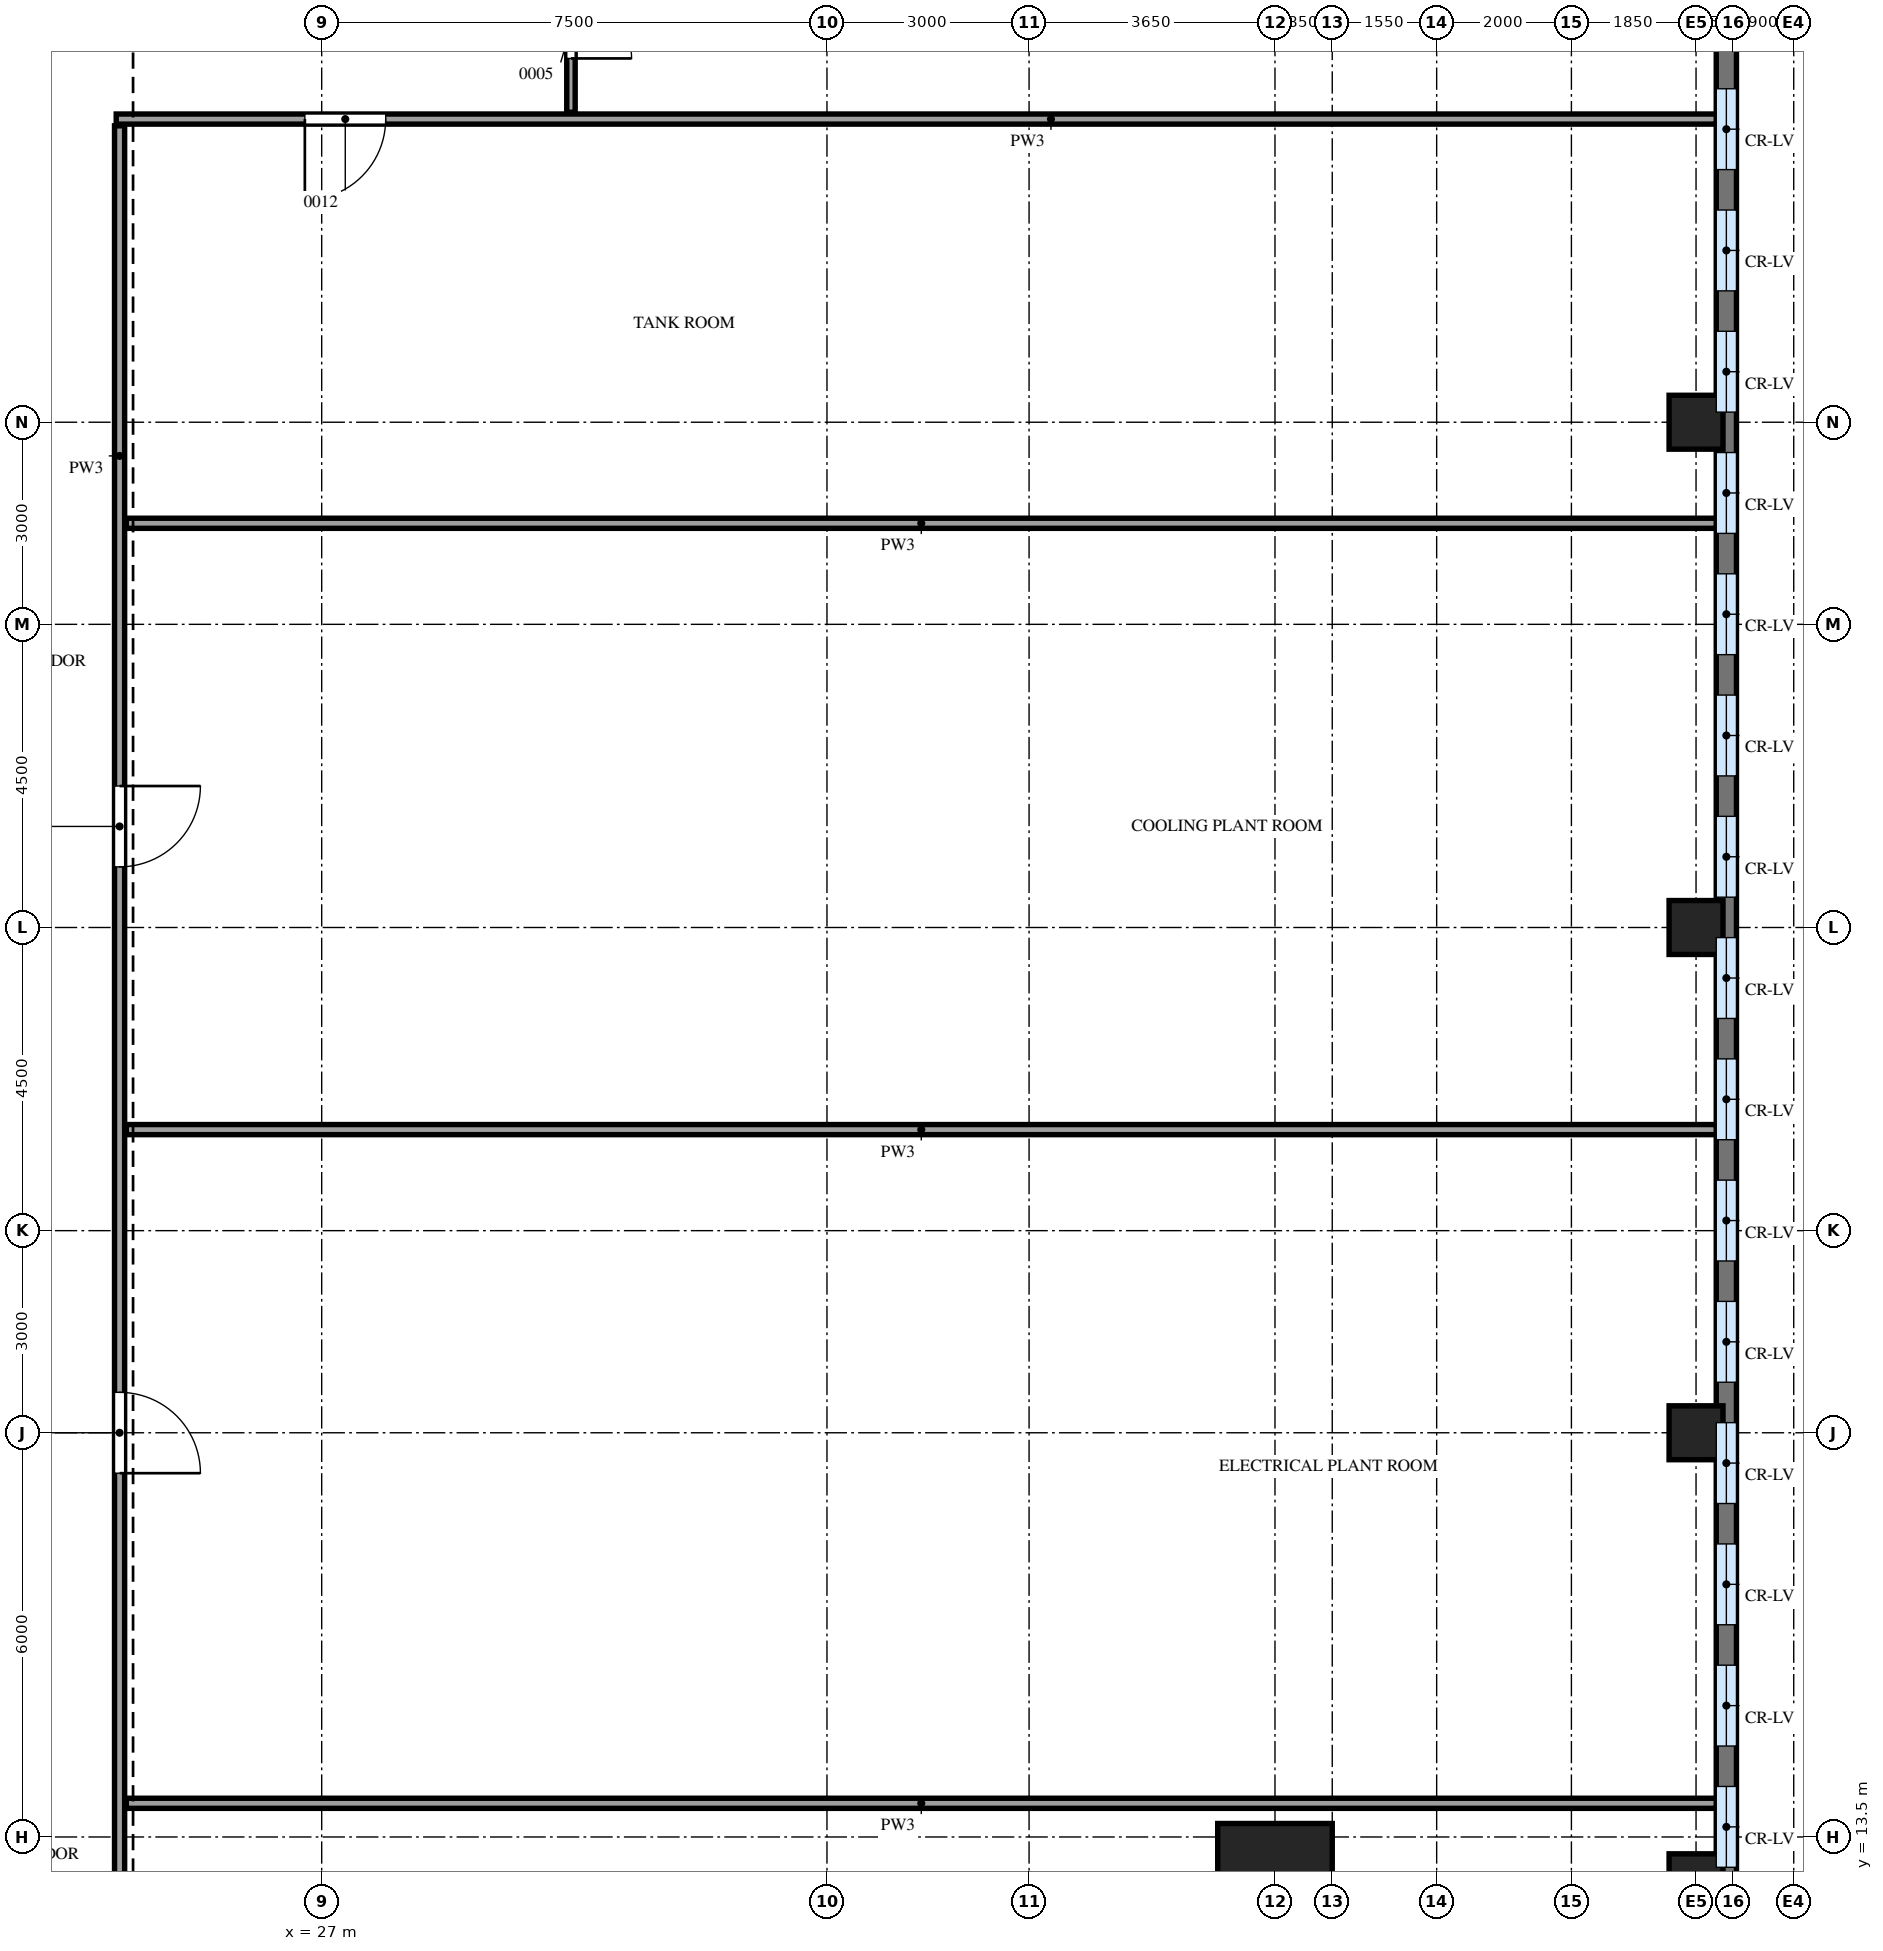
"""IFC4 building model, lengths in metres.
Left out: names, types, materials, properties, quantities, classifications, styles, units other than length and angle.
Written with IfcOpenShell. Run it as: python <this file> out.ifc"""

import sys

from ifc_helpers import new_model, si_unit, direction, frame, frame_2d, origin, origin_2d, place, context, subcontext, project, spatial, rectangle, extrude, source, transform, mapped, element, fill, save


model = new_model("IFC4")
c1 = context("Model", 3, precision=1e-05, world=origin(), true_north=direction((0.0, 1.0)))
c2 = subcontext(c1, "Body", "Model", "MODEL_VIEW")
j1 = project(units=[si_unit("LENGTHUNIT", "METRE"), si_unit("PLANEANGLEUNIT", "RADIAN")], contexts=[c1])
p1 = place(None, origin())
s1 = spatial("IfcSite", under=j1, at=p1, CompositionType="ELEMENT")
p2 = place(p1, origin())
s2 = spatial("IfcBuilding", under=s1, at=p2, CompositionType="ELEMENT")
p3 = place(p2, frame((0.0, 0.0, 330.2)))
s3 = spatial("IfcBuildingStorey", under=s2, at=p3, CompositionType="ELEMENT", Elevation=330.2)
m1 = source(origin(), c2, "Body", "SweptSolid", [
    extrude(rectangle(XDim=1.7, YDim=1.7, at=origin_2d()), origin(), (0.0, 0.0, 1.0), 4.5),
])
p4 = place(p3, frame((41.15, 12.85, 0.0), z_axis=(0.0, 0.0, 1.0), x_axis=(1.0, 0.0, 0.0)))
e1 = element("IfcColumn", 1, at=p4, inside=s3, PredefinedType="COLUMN", context=c2, shape_type="MappedRepresentation", body=[
    mapped(m1, transform((0.0, 0.0, 0.0))),
])
m2 = source(origin(), c2, "Body", "SweptSolid", [
    extrude(rectangle(XDim=0.8, YDim=0.8, at=origin_2d()), origin(), (0.0, 0.0, 1.0), 4.5),
])
for number, where, z_axis, x_axis in (
    (2, (47.4, 12.85, 0.0), (0.0, 0.0, 1.0), (1.0, 0.0, 0.0)),
    (3, (47.4, 19.5, 0.0), (0.0, 0.0, 1.0), (1.0, 0.0, 0.0)),
    (4, (47.4, 27.0, 0.0), (0.0, 0.0, 1.0), (1.0, 0.0, 0.0)),
    (5, (47.4, 34.5, 0.0), (0.0, 0.0, 1.0), (1.0, 0.0, 0.0)),
):
    element("IfcColumn", number, at=place(p3, frame(where, z_axis=z_axis, x_axis=x_axis)), inside=s3, PredefinedType="COLUMN", context=c2, shape_type="MappedRepresentation", body=[
        mapped(m2, transform((0.0, 0.0, 0.0))),
    ])
m3 = source(origin(), c2, "Body", "SweptSolid", [
    extrude(rectangle(XDim=29.7, YDim=0.3, at=frame_2d((14.85, 0.0))), origin(), (0.0, 0.0, 1.0), 4.5),
])
p5 = place(p3, frame((47.85, 12.3, 0.0), z_axis=(0.0, 0.0, 1.0), x_axis=(0.0, 1.0, 0.0)))
e6 = element("IfcWall", 6, at=p5, inside=s3, PredefinedType="SOLIDWALL", context=c2, shape_type="MappedRepresentation", body=[
    mapped(m3, transform((0.0, 0.0, 0.0))),
])
m4 = source(origin(), c2, "Body", "SweptSolid", [
    extrude(rectangle(XDim=1.2, YDim=2.4, at=frame_2d((0.6, 1.2))), frame((0.0, 0.16, 0.0), z_axis=(0.0, -1.0, 0.0), x_axis=(1.0, 0.0, 0.0)), (0.0, 0.0, 1.0), 0.32),
])
p6 = place(p5, frame((0.75, 0.0, 0.9)))
e7 = element("IfcOpeningElement", 7, at=p6, cuts=e6, PredefinedType="OPENING", context=c2, shape_type="MappedRepresentation", body=[
    mapped(m4, transform((0.0, 0.0, 0.0))),
])
p7 = place(p5, frame((2.55, 0.0, 0.9)))
e8 = element("IfcOpeningElement", 8, at=p7, cuts=e6, PredefinedType="OPENING", context=c2, shape_type="MappedRepresentation", body=[
    mapped(m4, transform((0.0, 0.0, 0.0))),
])
p8 = place(p5, frame((4.35, 0.0, 0.9)))
e9 = element("IfcOpeningElement", 9, at=p8, cuts=e6, PredefinedType="OPENING", context=c2, shape_type="MappedRepresentation", body=[
    mapped(m4, transform((0.0, 0.0, 0.0))),
])
p9 = place(p5, frame((6.15, 0.0, 0.9)))
e10 = element("IfcOpeningElement", 10, at=p9, cuts=e6, PredefinedType="OPENING", context=c2, shape_type="MappedRepresentation", body=[
    mapped(m4, transform((0.0, 0.0, 0.0))),
])
p10 = place(p5, frame((7.95, 0.0, 0.9)))
e11 = element("IfcOpeningElement", 11, at=p10, cuts=e6, PredefinedType="OPENING", context=c2, shape_type="MappedRepresentation", body=[
    mapped(m4, transform((0.0, 0.0, 0.0))),
])
p11 = place(p5, frame((9.75, 0.0, 0.9)))
e12 = element("IfcOpeningElement", 12, at=p11, cuts=e6, PredefinedType="OPENING", context=c2, shape_type="MappedRepresentation", body=[
    mapped(m4, transform((0.0, 0.0, 0.0))),
])
p12 = place(p5, frame((11.55, 0.0, 0.9)))
e13 = element("IfcOpeningElement", 13, at=p12, cuts=e6, PredefinedType="OPENING", context=c2, shape_type="MappedRepresentation", body=[
    mapped(m4, transform((0.0, 0.0, 0.0))),
])
p13 = place(p5, frame((13.35, 0.0, 0.9)))
e14 = element("IfcOpeningElement", 14, at=p13, cuts=e6, PredefinedType="OPENING", context=c2, shape_type="MappedRepresentation", body=[
    mapped(m4, transform((0.0, 0.0, 0.0))),
])
p14 = place(p5, frame((15.15, 0.0, 0.9)))
e15 = element("IfcOpeningElement", 15, at=p14, cuts=e6, PredefinedType="OPENING", context=c2, shape_type="MappedRepresentation", body=[
    mapped(m4, transform((0.0, 0.0, 0.0))),
])
p15 = place(p5, frame((16.95, 0.0, 0.9)))
e16 = element("IfcOpeningElement", 16, at=p15, cuts=e6, PredefinedType="OPENING", context=c2, shape_type="MappedRepresentation", body=[
    mapped(m4, transform((0.0, 0.0, 0.0))),
])
p16 = place(p5, frame((18.75, 0.0, 0.9)))
e17 = element("IfcOpeningElement", 17, at=p16, cuts=e6, PredefinedType="OPENING", context=c2, shape_type="MappedRepresentation", body=[
    mapped(m4, transform((0.0, 0.0, 0.0))),
])
p17 = place(p5, frame((20.55, 0.0, 0.9)))
e18 = element("IfcOpeningElement", 18, at=p17, cuts=e6, PredefinedType="OPENING", context=c2, shape_type="MappedRepresentation", body=[
    mapped(m4, transform((0.0, 0.0, 0.0))),
])
p18 = place(p5, frame((22.35, 0.0, 0.9)))
e19 = element("IfcOpeningElement", 19, at=p18, cuts=e6, PredefinedType="OPENING", context=c2, shape_type="MappedRepresentation", body=[
    mapped(m4, transform((0.0, 0.0, 0.0))),
])
p19 = place(p5, frame((24.15, 0.0, 0.9)))
e20 = element("IfcOpeningElement", 20, at=p19, cuts=e6, PredefinedType="OPENING", context=c2, shape_type="MappedRepresentation", body=[
    mapped(m4, transform((0.0, 0.0, 0.0))),
])
p20 = place(p5, frame((25.95, 0.0, 0.9)))
e21 = element("IfcOpeningElement", 21, at=p20, cuts=e6, PredefinedType="OPENING", context=c2, shape_type="MappedRepresentation", body=[
    mapped(m4, transform((0.0, 0.0, 0.0))),
])
p21 = place(p5, frame((27.75, 0.0, 0.9)))
e22 = element("IfcOpeningElement", 22, at=p21, cuts=e6, PredefinedType="OPENING", context=c2, shape_type="MappedRepresentation", body=[
    mapped(m4, transform((0.0, 0.0, 0.0))),
])
m5 = source(origin(), c2, "Body", "SweptSolid", [
    extrude(rectangle(XDim=32.6, YDim=0.15, at=frame_2d((16.3, 0.0))), origin(), (0.0, 0.0, 1.0), 4.3),
])
p22 = place(p3, frame((24.0, 6.3, 0.0), z_axis=(0.0, 0.0, 1.0), x_axis=(0.0, 1.0, 0.0)))
e23 = element("IfcWall", 23, at=p22, inside=s3, PredefinedType="PARTITIONING", context=c2, shape_type="MappedRepresentation", body=[
    mapped(m5, transform((0.0, 0.0, 0.0))),
])
m6 = source(origin(), c2, "Body", "SweptSolid", [
    extrude(rectangle(XDim=1.2, YDim=2.1, at=frame_2d((0.6, 1.05))), frame((0.0, 0.085, 0.0), z_axis=(0.0, -1.0, 0.0), x_axis=(1.0, 0.0, 0.0)), (0.0, 0.0, 1.0), 0.17),
])
p23 = place(p22, frame((3.1, 0.0, 0.0)))
e24 = element("IfcOpeningElement", 24, at=p23, cuts=e23, PredefinedType="OPENING", context=c2, shape_type="MappedRepresentation", body=[
    mapped(m6, transform((0.0, 0.0, 0.0))),
])
p24 = place(p22, frame((12.6, 0.0, 0.0)))
e25 = element("IfcOpeningElement", 25, at=p24, cuts=e23, PredefinedType="OPENING", context=c2, shape_type="MappedRepresentation", body=[
    mapped(m6, transform((0.0, 0.0, 0.0))),
])
p25 = place(p22, frame((21.6, 0.0, 0.0)))
e26 = element("IfcOpeningElement", 26, at=p25, cuts=e23, PredefinedType="OPENING", context=c2, shape_type="MappedRepresentation", body=[
    mapped(m6, transform((0.0, 0.0, 0.0))),
])
m7 = source(origin(), c2, "Body", "SweptSolid", [
    extrude(rectangle(XDim=23.6, YDim=0.15, at=frame_2d((11.8, 0.0))), origin(), (0.0, 0.0, 1.0), 4.3),
])
for number, where, z_axis, x_axis in (
    (27, (24.1, 14.0, 0.0), (0.0, 0.0, 1.0), (1.0, 0.0, 0.0)),
    (28, (24.1, 24.0, 0.0), (0.0, 0.0, 1.0), (1.0, 0.0, 0.0)),
    (29, (24.1, 33.0, 0.0), (0.0, 0.0, 1.0), (1.0, 0.0, 0.0)),
):
    element("IfcWall", number, at=place(p3, frame(where, z_axis=z_axis, x_axis=x_axis)), inside=s3, PredefinedType="PARTITIONING", context=c2, shape_type="MappedRepresentation", body=[
        mapped(m7, transform((0.0, 0.0, 0.0))),
    ])
m8 = source(origin(), c2, "Body", "SweptSolid", [
    extrude(rectangle(XDim=23.75, YDim=0.15, at=frame_2d((11.875, 0.0))), origin(), (0.0, 0.0, 1.0), 4.3),
])
p26 = place(p3, frame((23.95, 39.0, 0.0), z_axis=(0.0, 0.0, 1.0), x_axis=(1.0, 0.0, 0.0)))
e30 = element("IfcWall", 30, at=p26, inside=s3, PredefinedType="PARTITIONING", context=c2, shape_type="MappedRepresentation", body=[
    mapped(m8, transform((0.0, 0.0, 0.0))),
])
p27 = place(p26, frame((2.8, 0.0, 0.0)))
e31 = element("IfcOpeningElement", 31, at=p27, cuts=e30, PredefinedType="OPENING", context=c2, shape_type="MappedRepresentation", body=[
    mapped(m6, transform((0.0, 0.0, 0.0))),
])
m9 = source(origin(), c2, "Body", "SweptSolid", [
    extrude(rectangle(XDim=8.6, YDim=0.125, at=frame_2d((4.3, 0.0))), origin(), (0.0, 0.0, 1.0), 4.3),
])
p28 = place(p3, frame((30.7, 39.1, 0.0), z_axis=(0.0, 0.0, 1.0), x_axis=(0.0, 1.0, 0.0)))
e32 = element("IfcWall", 32, at=p28, inside=s3, PredefinedType="PARTITIONING", context=c2, shape_type="MappedRepresentation", body=[
    mapped(m9, transform((0.0, 0.0, 0.0))),
])
m10 = source(origin(), c2, "Body", "SweptSolid", [
    extrude(rectangle(XDim=0.9, YDim=2.1, at=frame_2d((0.45, 1.05))), frame((0.0, 0.073, 0.0), z_axis=(0.0, -1.0, 0.0), x_axis=(1.0, 0.0, 0.0)), (0.0, 0.0, 1.0), 0.145),
])
p29 = place(p28, frame((0.8, 0.0, 0.0)))
e33 = element("IfcOpeningElement", 33, at=p29, cuts=e32, PredefinedType="OPENING", context=c2, shape_type="MappedRepresentation", body=[
    mapped(m10, transform((0.0, 0.0, 0.0))),
])
m11 = source(origin(), c2, "Body", "SweptSolid", [
    extrude(rectangle(XDim=1.2, YDim=2.1, at=frame_2d((0.6, 1.05))), frame((0.0, 0.073, 0.0), z_axis=(0.0, -1.0, 0.0), x_axis=(1.0, 0.0, 0.0)), (0.0, 0.0, 1.0), 0.145),
])
p30 = place(p28, frame((4.1, 0.0, 0.0)))
e34 = element("IfcOpeningElement", 34, at=p30, cuts=e32, PredefinedType="OPENING", context=c2, shape_type="MappedRepresentation", body=[
    mapped(m11, transform((0.0, 0.0, 0.0))),
])
m12 = source(origin(), c2, "Body", "SweptSolid", [
    extrude(rectangle(XDim=1.2, YDim=2.4, at=frame_2d((0.6, 1.2))), frame((0.0, 0.03, 0.0), z_axis=(0.0, -1.0, 0.0), x_axis=(1.0, 0.0, 0.0)), (0.0, 0.0, 1.0), 0.06),
])
p31 = place(p6, origin())
e35 = element("IfcWindow", 35, at=p31, inside=s3, PartitioningType="SINGLE_PANEL", PredefinedType="WINDOW", context=c2, shape_type="MappedRepresentation", body=[
    mapped(m12, transform((0.0, 0.0, 0.0))),
])
fill(e7, e35)
p32 = place(p7, origin())
e36 = element("IfcWindow", 36, at=p32, inside=s3, PartitioningType="SINGLE_PANEL", PredefinedType="WINDOW", context=c2, shape_type="MappedRepresentation", body=[
    mapped(m12, transform((0.0, 0.0, 0.0))),
])
fill(e8, e36)
p33 = place(p8, origin())
e37 = element("IfcWindow", 37, at=p33, inside=s3, PartitioningType="SINGLE_PANEL", PredefinedType="WINDOW", context=c2, shape_type="MappedRepresentation", body=[
    mapped(m12, transform((0.0, 0.0, 0.0))),
])
fill(e9, e37)
p34 = place(p9, origin())
e38 = element("IfcWindow", 38, at=p34, inside=s3, PartitioningType="SINGLE_PANEL", PredefinedType="WINDOW", context=c2, shape_type="MappedRepresentation", body=[
    mapped(m12, transform((0.0, 0.0, 0.0))),
])
fill(e10, e38)
p35 = place(p10, origin())
e39 = element("IfcWindow", 39, at=p35, inside=s3, PartitioningType="SINGLE_PANEL", PredefinedType="WINDOW", context=c2, shape_type="MappedRepresentation", body=[
    mapped(m12, transform((0.0, 0.0, 0.0))),
])
fill(e11, e39)
p36 = place(p11, origin())
e40 = element("IfcWindow", 40, at=p36, inside=s3, PartitioningType="SINGLE_PANEL", PredefinedType="WINDOW", context=c2, shape_type="MappedRepresentation", body=[
    mapped(m12, transform((0.0, 0.0, 0.0))),
])
fill(e12, e40)
p37 = place(p12, origin())
e41 = element("IfcWindow", 41, at=p37, inside=s3, PartitioningType="SINGLE_PANEL", PredefinedType="WINDOW", context=c2, shape_type="MappedRepresentation", body=[
    mapped(m12, transform((0.0, 0.0, 0.0))),
])
fill(e13, e41)
p38 = place(p13, origin())
e42 = element("IfcWindow", 42, at=p38, inside=s3, PartitioningType="SINGLE_PANEL", PredefinedType="WINDOW", context=c2, shape_type="MappedRepresentation", body=[
    mapped(m12, transform((0.0, 0.0, 0.0))),
])
fill(e14, e42)
p39 = place(p14, origin())
e43 = element("IfcWindow", 43, at=p39, inside=s3, PartitioningType="SINGLE_PANEL", PredefinedType="WINDOW", context=c2, shape_type="MappedRepresentation", body=[
    mapped(m12, transform((0.0, 0.0, 0.0))),
])
fill(e15, e43)
p40 = place(p15, origin())
e44 = element("IfcWindow", 44, at=p40, inside=s3, PartitioningType="SINGLE_PANEL", PredefinedType="WINDOW", context=c2, shape_type="MappedRepresentation", body=[
    mapped(m12, transform((0.0, 0.0, 0.0))),
])
fill(e16, e44)
p41 = place(p16, origin())
e45 = element("IfcWindow", 45, at=p41, inside=s3, PartitioningType="SINGLE_PANEL", PredefinedType="WINDOW", context=c2, shape_type="MappedRepresentation", body=[
    mapped(m12, transform((0.0, 0.0, 0.0))),
])
fill(e17, e45)
p42 = place(p17, origin())
e46 = element("IfcWindow", 46, at=p42, inside=s3, PartitioningType="SINGLE_PANEL", PredefinedType="WINDOW", context=c2, shape_type="MappedRepresentation", body=[
    mapped(m12, transform((0.0, 0.0, 0.0))),
])
fill(e18, e46)
p43 = place(p18, origin())
e47 = element("IfcWindow", 47, at=p43, inside=s3, PartitioningType="SINGLE_PANEL", PredefinedType="WINDOW", context=c2, shape_type="MappedRepresentation", body=[
    mapped(m12, transform((0.0, 0.0, 0.0))),
])
fill(e19, e47)
p44 = place(p19, origin())
e48 = element("IfcWindow", 48, at=p44, inside=s3, PartitioningType="SINGLE_PANEL", PredefinedType="WINDOW", context=c2, shape_type="MappedRepresentation", body=[
    mapped(m12, transform((0.0, 0.0, 0.0))),
])
fill(e20, e48)
p45 = place(p20, origin())
e49 = element("IfcWindow", 49, at=p45, inside=s3, PartitioningType="SINGLE_PANEL", PredefinedType="WINDOW", context=c2, shape_type="MappedRepresentation", body=[
    mapped(m12, transform((0.0, 0.0, 0.0))),
])
fill(e21, e49)
m13 = source(origin(), c2, "Body", "SweptSolid", [
    extrude(rectangle(XDim=1.2, YDim=2.1, at=frame_2d((0.6, 1.05))), frame((0.0, 0.025, 0.0), z_axis=(0.0, -1.0, 0.0), x_axis=(1.0, 0.0, 0.0)), (0.0, 0.0, 1.0), 0.05),
])
p46 = place(p24, origin())
e50 = element("IfcDoor", 50, at=p46, inside=s3, OperationType="SINGLE_SWING_LEFT", PredefinedType="DOOR", context=c2, shape_type="MappedRepresentation", body=[
    mapped(m13, transform((0.0, 0.0, 0.0))),
])
fill(e25, e50)
p47 = place(p25, origin())
e51 = element("IfcDoor", 51, at=p47, inside=s3, OperationType="SINGLE_SWING_RIGHT", PredefinedType="DOOR", context=c2, shape_type="MappedRepresentation", body=[
    mapped(m13, transform((0.0, 0.0, 0.0))),
])
fill(e26, e51)
p48 = place(p27, origin())
e52 = element("IfcDoor", 52, at=p48, inside=s3, OperationType="SINGLE_SWING_LEFT", PredefinedType="DOOR", context=c2, shape_type="MappedRepresentation", body=[
    mapped(m13, transform((0.0, 0.0, 0.0))),
])
fill(e31, e52)
m14 = source(origin(), c2, "Body", "SweptSolid", [
    extrude(rectangle(XDim=0.9, YDim=2.1, at=frame_2d((0.45, 1.05))), frame((0.0, 0.025, 0.0), z_axis=(0.0, -1.0, 0.0), x_axis=(1.0, 0.0, 0.0)), (0.0, 0.0, 1.0), 0.05),
])
p49 = place(p29, origin())
e53 = element("IfcDoor", 53, at=p49, inside=s3, OperationType="SINGLE_SWING_LEFT", PredefinedType="DOOR", context=c2, shape_type="MappedRepresentation", body=[
    mapped(m14, transform((0.0, 0.0, 0.0))),
])
fill(e33, e53)
save(model, sys.argv[1])
